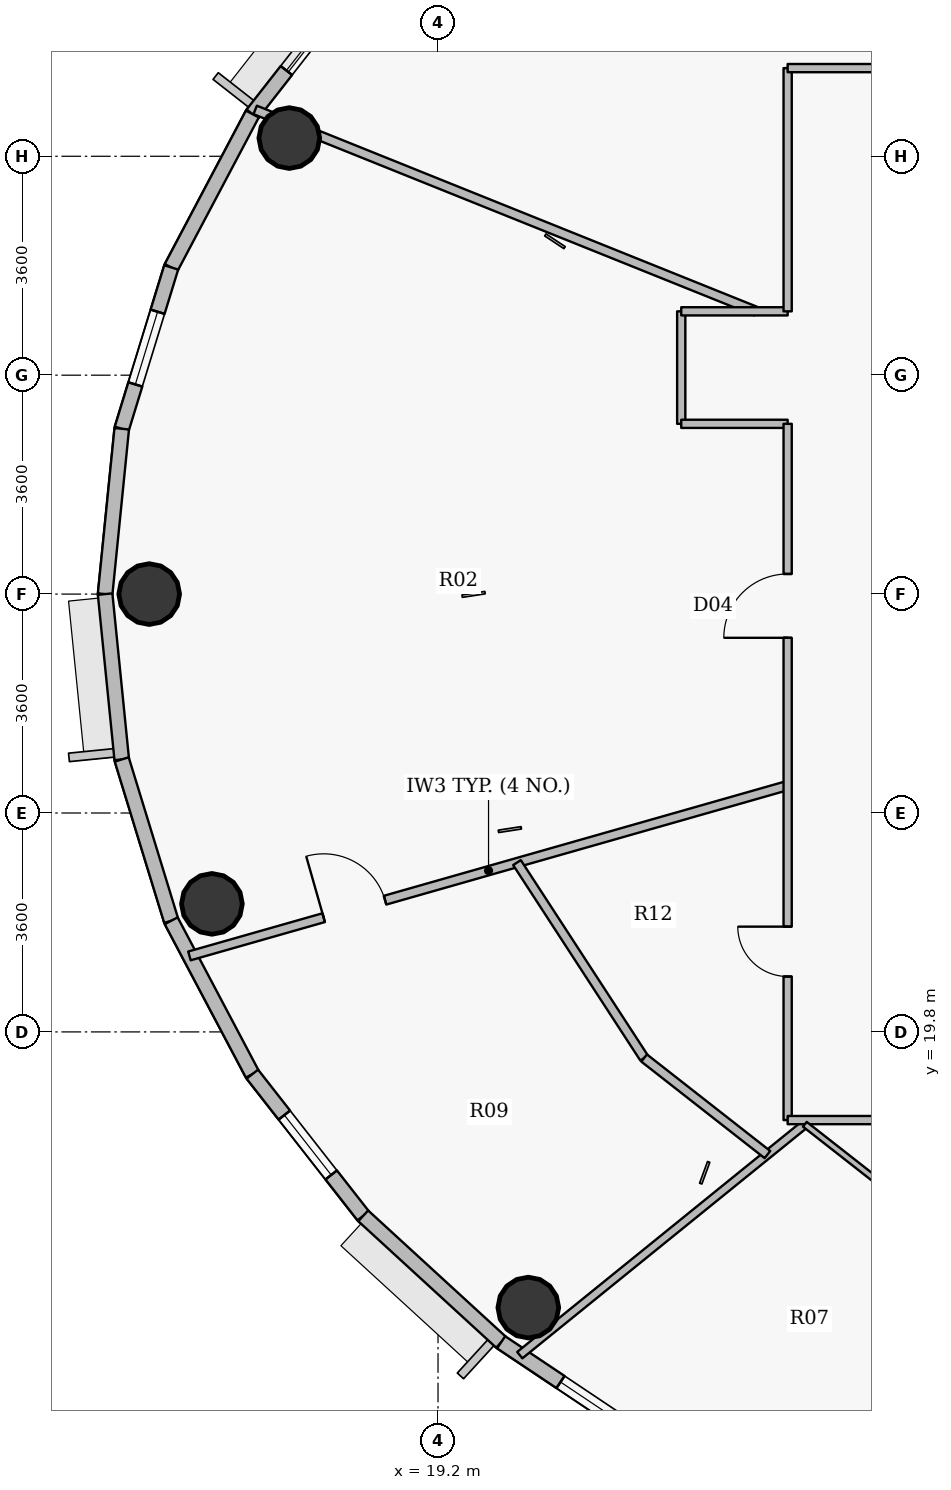
"""IFC4 building model, lengths in metres.
Left out: names, types, materials, properties, quantities, classifications, styles, units other than length and angle.
Written with IfcOpenShell. Run it as: python <this file> out.ifc"""

import sys

from ifc_helpers import new_model, si_unit, direction, frame, frame_2d, origin, origin_2d, place, context, subcontext, project, spatial, rectangle, hollow_circle, extrude, source, transform, mapped, element, fill, save


model = new_model("IFC4")
c1 = context("Model", 3, precision=1e-05, world=origin(), true_north=direction((0.0, 1.0)))
c2 = subcontext(c1, "Body", "Model", "MODEL_VIEW")
j1 = project(units=[si_unit("LENGTHUNIT", "METRE"), si_unit("PLANEANGLEUNIT", "RADIAN")], contexts=[c1])
p1 = place(None, origin())
s1 = spatial("IfcSite", under=j1, at=p1, CompositionType="ELEMENT")
p2 = place(p1, origin())
s2 = spatial("IfcBuilding", under=s1, at=p2, CompositionType="ELEMENT")
p3 = place(p2, frame((0.0, 0.0, 306.75)))
s3 = spatial("IfcBuildingStorey", under=s2, at=p3, CompositionType="ELEMENT", Elevation=306.75)
for number, where, z_axis, x_axis in (
    (1, (16.754, 34.5, 0.0), (0.0, 0.0, 1.0), (1.0, 0.0, 0.0)),
    (2, (14.45, 27.0, 0.0), (0.0, 0.0, 1.0), (1.0, 0.0, 0.0)),
    (3, (15.481, 21.906, 0.0), (0.0, 0.0, 1.0), (1.0, 0.0, 0.0)),
    (4, (20.685, 15.267, 0.0), (0.0, 0.0, 1.0), (1.0, 0.0, 0.0)),
):
    element("IfcColumn", number, at=place(p3, frame(where, z_axis=z_axis, x_axis=x_axis)), inside=s3, PredefinedType="COLUMN", context=c2, shape_type="SweptSolid", body=[
        extrude(hollow_circle(Radius=0.5, WallThickness=0.032, at=origin_2d()), origin(), (0.0, 0.0, 1.0), 3.75),
    ])
p4 = place(p3, frame((16.146, 34.895, 0.0), z_axis=(0.0, 0.0, 1.0), x_axis=(0.616337186556, 0.787482363275, 0.0)))
e5 = element("IfcWall", 5, at=p4, inside=s3, PredefinedType="SOLIDWALL", context=c2, shape_type="SweptSolid", body=[
    extrude(rectangle(XDim=2.958, YDim=0.24, at=frame_2d((1.479, 0.0))), origin(), (0.0, 0.0, 1.0), 3.5),
])
p5 = place(p4, frame((0.909, 0.0, 0.9)))
e6 = element("IfcOpeningElement", 6, at=p5, cuts=e5, PredefinedType="OPENING", context=c2, shape_type="SweptSolid", body=[
    extrude(rectangle(XDim=1.25, YDim=1.65, at=origin_2d()), frame((0.625, 0.13, 0.825), z_axis=(0.0, -1.0, 0.0), x_axis=(1.0, 0.0, 0.0)), (0.0, 0.0, 1.0), 0.26),
])
p6 = place(p3, frame((14.812, 32.372, 0.0), z_axis=(0.0, 0.0, 1.0), x_axis=(0.467628269026, 0.883925224218, 0.0)))
e7 = element("IfcWall", 7, at=p6, inside=s3, PredefinedType="SOLIDWALL", context=c2, shape_type="SweptSolid", body=[
    extrude(rectangle(XDim=2.854, YDim=0.24, at=frame_2d((1.427, 0.0))), origin(), (0.0, 0.0, 1.0), 3.5),
])
p7 = place(p3, frame((13.998, 29.719, 0.0), z_axis=(0.0, 0.0, 1.0), x_axis=(0.2931213403, 0.956075248012, 0.0)))
e8 = element("IfcWall", 8, at=p7, inside=s3, PredefinedType="SOLIDWALL", context=c2, shape_type="SweptSolid", body=[
    extrude(rectangle(XDim=2.775, YDim=0.24, at=frame_2d((1.388, 0.0))), origin(), (0.0, 0.0, 1.0), 3.5),
])
p8 = place(p7, frame((0.763, 0.0, 0.9)))
e9 = element("IfcOpeningElement", 9, at=p8, cuts=e8, PredefinedType="OPENING", context=c2, shape_type="SweptSolid", body=[
    extrude(rectangle(XDim=1.25, YDim=1.65, at=origin_2d()), frame((0.625, 0.13, 0.825), z_axis=(0.0, -1.0, 0.0), x_axis=(1.0, 0.0, 0.0)), (0.0, 0.0, 1.0), 0.26),
])
for number, where, z_axis, x_axis in (
    (10, (13.725, 27.0, 0.0), (0.0, 0.0, 1.0), (0.1, 0.995, 0.0)),
    (11, (13.998, 24.281, 0.0), (0.0, 0.0, 1.0), (-0.1, 0.995, 0.0)),
):
    element("IfcWall", number, at=place(p3, frame(where, z_axis=z_axis, x_axis=x_axis)), inside=s3, PredefinedType="SOLIDWALL", context=c2, shape_type="SweptSolid", body=[
        extrude(rectangle(XDim=2.733, YDim=0.24, at=frame_2d((1.366, 0.0))), origin(), (0.0, 0.0, 1.0), 3.5),
    ])
p9 = place(p3, frame((14.812, 21.628, 0.0), z_axis=(0.0, 0.0, 1.0), x_axis=(-0.2931213403, 0.956075248012, 0.0)))
e12 = element("IfcWall", 12, at=p9, inside=s3, PredefinedType="SOLIDWALL", context=c2, shape_type="SweptSolid", body=[
    extrude(rectangle(XDim=2.775, YDim=0.24, at=frame_2d((1.388, 0.0))), origin(), (0.0, 0.0, 1.0), 3.5),
])
p10 = place(p3, frame((16.146, 19.105, 0.0), z_axis=(0.0, 0.0, 1.0), x_axis=(-0.467628269026, 0.883925224218, 0.0)))
e13 = element("IfcWall", 13, at=p10, inside=s3, PredefinedType="SOLIDWALL", context=c2, shape_type="SweptSolid", body=[
    extrude(rectangle(XDim=2.854, YDim=0.24, at=frame_2d((1.427, 0.0))), origin(), (0.0, 0.0, 1.0), 3.5),
])
p11 = place(p3, frame((17.97, 16.775, 0.0), z_axis=(0.0, 0.0, 1.0), x_axis=(-0.616337186556, 0.787482363275, 0.0)))
e14 = element("IfcWall", 14, at=p11, inside=s3, PredefinedType="SOLIDWALL", context=c2, shape_type="SweptSolid", body=[
    extrude(rectangle(XDim=2.958, YDim=0.24, at=frame_2d((1.479, 0.0))), origin(), (0.0, 0.0, 1.0), 3.5),
])
p12 = place(p11, frame((0.854, 0.0, 0.9)))
e15 = element("IfcOpeningElement", 15, at=p12, cuts=e14, PredefinedType="OPENING", context=c2, shape_type="SweptSolid", body=[
    extrude(rectangle(XDim=1.25, YDim=1.65, at=origin_2d()), frame((0.625, 0.13, 0.825), z_axis=(0.0, -1.0, 0.0), x_axis=(1.0, 0.0, 0.0)), (0.0, 0.0, 1.0), 0.26),
])
p13 = place(p3, frame((20.238, 14.696, 0.0), z_axis=(0.0, 0.0, 1.0), x_axis=(-0.737068506972, 0.675818034703, 0.0)))
e16 = element("IfcWall", 16, at=p13, inside=s3, PredefinedType="SOLIDWALL", context=c2, shape_type="SweptSolid", body=[
    extrude(rectangle(XDim=3.077, YDim=0.24, at=frame_2d((1.539, 0.0))), origin(), (0.0, 0.0, 1.0), 3.5),
])
p14 = place(p3, frame((22.896, 12.918, 0.0), z_axis=(0.0, 0.0, 1.0), x_axis=(-0.831250592635, 0.55589787933, 0.0)))
e17 = element("IfcWall", 17, at=p14, inside=s3, PredefinedType="SOLIDWALL", context=c2, shape_type="SweptSolid", body=[
    extrude(rectangle(XDim=3.197, YDim=0.24, at=frame_2d((1.599, 0.0))), origin(), (0.0, 0.0, 1.0), 3.5),
])
p15 = place(p14, frame((0.772, 0.0, 0.9)))
e18 = element("IfcOpeningElement", 18, at=p15, cuts=e17, PredefinedType="OPENING", context=c2, shape_type="SweptSolid", body=[
    extrude(rectangle(XDim=1.25, YDim=1.65, at=origin_2d()), frame((0.625, 0.13, 0.825), z_axis=(0.0, -1.0, 0.0), x_axis=(1.0, 0.0, 0.0)), (0.0, 0.0, 1.0), 0.26),
])
p16 = place(p3, frame((15.112, 21.05, 0.0), z_axis=(0.0, 0.0, 1.0), x_axis=(0.961740695875, 0.273961373004, 0.0)))
e19 = element("IfcWall", 19, at=p16, inside=s3, PredefinedType="PARTITIONING", context=c2, shape_type="SweptSolid", body=[
    extrude(rectangle(XDim=10.229, YDim=0.15, at=frame_2d((5.115, 0.0))), origin(), (0.0, 0.0, 1.0), 2.985),
])
p17 = place(p16, frame((2.295, 0.0, 0.0)))
e20 = element("IfcOpeningElement", 20, at=p17, cuts=e19, PredefinedType="OPENING", context=c2, shape_type="SweptSolid", body=[
    extrude(rectangle(XDim=1.05, YDim=2.15, at=origin_2d()), frame((0.525, 0.085, 1.075), z_axis=(0.0, -1.0, 0.0), x_axis=(1.0, 0.0, 0.0)), (0.0, 0.0, 1.0), 0.17),
])
p18 = place(p3, frame((16.193, 34.962, 0.0), z_axis=(0.0, 0.0, 1.0), x_axis=(0.927839710722, -0.372979183343, 0.0)))
e21 = element("IfcWall", 21, at=p18, inside=s3, PredefinedType="PARTITIONING", context=c2, shape_type="SweptSolid", body=[
    extrude(rectangle(XDim=8.874, YDim=0.15, at=frame_2d((4.437, 0.0))), origin(), (0.0, 0.0, 1.0), 2.985),
])
p19 = place(p3, frame((20.499, 22.584, 0.0), z_axis=(0.0, 0.0, 1.0), x_axis=(0.545422512832, -0.838161250892, 0.0)))
e22 = element("IfcWall", 22, at=p19, inside=s3, PredefinedType="PARTITIONING", context=c2, shape_type="SweptSolid", body=[
    extrude(rectangle(XDim=3.834, YDim=0.15, at=frame_2d((1.917, 0.0))), origin(), (0.0, 0.0, 1.0), 3.5),
])
p20 = place(p3, frame((20.545, 14.485, 0.0), z_axis=(0.0, 0.0, 1.0), x_axis=(0.77715155867, 0.629313479004, 0.0)))
e23 = element("IfcWall", 23, at=p20, inside=s3, PredefinedType="PARTITIONING", context=c2, shape_type="SweptSolid", body=[
    extrude(rectangle(XDim=6.032, YDim=0.135, at=frame_2d((3.016, 0.0))), origin(), (0.0, 0.0, 1.0), 2.985),
])
p21 = place(p3, frame((22.59, 19.371, 0.0), z_axis=(0.0, 0.0, 1.0), x_axis=(0.78729093539, -0.616581692116, 0.0)))
e24 = element("IfcWall", 24, at=p21, inside=s3, PredefinedType="PARTITIONING", context=c2, shape_type="SweptSolid", body=[
    extrude(rectangle(XDim=2.576, YDim=0.15, at=frame_2d((1.288, 0.0))), origin(), (0.0, 0.0, 1.0), 3.035),
])
p22 = place(p3, frame((23.2, 29.8, 0.0), z_axis=(0.0, 0.0, 1.0), x_axis=(0.0, 1.0, 0.0)))
e25 = element("IfcWall", 25, at=p22, inside=s3, PredefinedType="PARTITIONING", context=c2, shape_type="SweptSolid", body=[
    extrude(rectangle(XDim=1.85, YDim=0.135, at=frame_2d((0.925, 0.0))), origin(), (0.0, 0.0, 1.0), 3.5),
])
p23 = place(p3, frame((23.2, 29.8, 0.0), z_axis=(0.0, 0.0, 1.0), x_axis=(1.0, 0.0, 0.0)))
e26 = element("IfcWall", 26, at=p23, inside=s3, PredefinedType="PARTITIONING", context=c2, shape_type="SweptSolid", body=[
    extrude(rectangle(XDim=1.75, YDim=0.135, at=frame_2d((0.875, 0.0))), origin(), (0.0, 0.0, 1.0), 3.5),
])
p24 = place(p3, frame((23.2, 31.65, 0.0), z_axis=(0.0, 0.0, 1.0), x_axis=(1.0, 0.0, 0.0)))
e27 = element("IfcWall", 27, at=p24, inside=s3, PredefinedType="PARTITIONING", context=c2, shape_type="SweptSolid", body=[
    extrude(rectangle(XDim=1.75, YDim=0.135, at=frame_2d((0.875, 0.0))), origin(), (0.0, 0.0, 1.0), 3.035),
])
p25 = place(p3, frame((24.95, 18.35, 0.0), z_axis=(0.0, 0.0, 1.0), x_axis=(0.0, 1.0, 0.0)))
e28 = element("IfcWall", 28, at=p25, inside=s3, PredefinedType="PARTITIONING", context=c2, shape_type="SweptSolid", body=[
    extrude(rectangle(XDim=11.45, YDim=0.135, at=frame_2d((5.725, 0.0))), origin(), (0.0, 0.0, 1.0), 3.035),
])
p26 = place(p25, frame((7.931, 0.0, 0.0)))
e29 = element("IfcOpeningElement", 29, at=p26, cuts=e28, PredefinedType="OPENING", context=c2, shape_type="SweptSolid", body=[
    extrude(rectangle(XDim=1.05, YDim=2.15, at=origin_2d()), frame((0.525, 0.078, 1.075), z_axis=(0.0, -1.0, 0.0), x_axis=(1.0, 0.0, 0.0)), (0.0, 0.0, 1.0), 0.155),
])
p27 = place(p25, frame((2.361, 0.0, 0.0)))
e30 = element("IfcOpeningElement", 30, at=p27, cuts=e28, PredefinedType="OPENING", context=c2, shape_type="SweptSolid", body=[
    extrude(rectangle(XDim=0.82, YDim=2.1, at=origin_2d()), frame((0.41, 0.078, 1.05), z_axis=(0.0, -1.0, 0.0), x_axis=(1.0, 0.0, 0.0)), (0.0, 0.0, 1.0), 0.155),
])
p28 = place(p3, frame((24.95, 18.35, 0.0), z_axis=(0.0, 0.0, 1.0), x_axis=(1.0, 0.0, 0.0)))
e31 = element("IfcWall", 31, at=p28, inside=s3, PredefinedType="PARTITIONING", context=c2, shape_type="SweptSolid", body=[
    extrude(rectangle(XDim=19.311, YDim=0.135, at=frame_2d((9.655, 0.0))), origin(), (0.0, 0.0, 1.0), 3.035),
])
p29 = place(p28, frame((9.319, 0.0, 0.0)))
e32 = element("IfcOpeningElement", 32, at=p29, cuts=e31, PredefinedType="OPENING", context=c2, shape_type="SweptSolid", body=[
    extrude(rectangle(XDim=1.0, YDim=2.15, at=origin_2d()), frame((0.5, 0.078, 1.075), z_axis=(0.0, -1.0, 0.0), x_axis=(1.0, 0.0, 0.0)), (0.0, 0.0, 1.0), 0.155),
])
p30 = place(p3, frame((24.95, 31.65, 0.0), z_axis=(0.0, 0.0, 1.0), x_axis=(0.0, 1.0, 0.0)))
e33 = element("IfcWall", 33, at=p30, inside=s3, PredefinedType="PARTITIONING", context=c2, shape_type="SweptSolid", body=[
    extrude(rectangle(XDim=4.0, YDim=0.135, at=frame_2d((2.0, 0.0))), origin(), (0.0, 0.0, 1.0), 3.035),
])
p31 = place(p3, frame((24.95, 35.65, 0.0), z_axis=(0.0, 0.0, 1.0), x_axis=(1.0, 0.0, 0.0)))
e34 = element("IfcWall", 34, at=p31, inside=s3, PredefinedType="PARTITIONING", context=c2, shape_type="SweptSolid", body=[
    extrude(rectangle(XDim=10.1, YDim=0.135, at=frame_2d((5.05, 0.0))), origin(), (0.0, 0.0, 1.0), 3.035),
])
p32 = place(p31, frame((3.094, 0.0, 0.0)))
e35 = element("IfcOpeningElement", 35, at=p32, cuts=e34, PredefinedType="OPENING", context=c2, shape_type="SweptSolid", body=[
    extrude(rectangle(XDim=1.05, YDim=2.15, at=origin_2d()), frame((0.525, 0.078, 1.075), z_axis=(0.0, -1.0, 0.0), x_axis=(1.0, 0.0, 0.0)), (0.0, 0.0, 1.0), 0.155),
])
p33 = place(p3, frame((25.233, 18.281, 0.0), z_axis=(0.0, 0.0, 1.0), x_axis=(0.787345395334, -0.61651214785, 0.0)))
e36 = element("IfcWall", 36, at=p33, inside=s3, PredefinedType="PARTITIONING", context=c2, shape_type="SweptSolid", body=[
    extrude(rectangle(XDim=1.969, YDim=0.1, at=frame_2d((0.985, 0.0))), origin(), (0.0, 0.0, 1.0), 3.5),
])
m1 = source(origin(), c2, "Body", "SweptSolid", [
    extrude(rectangle(XDim=1.25, YDim=1.65, at=origin_2d()), frame((0.625, 0.03, 0.825), z_axis=(0.0, -1.0, 0.0), x_axis=(1.0, 0.0, 0.0)), (0.0, 0.0, 1.0), 0.06),
])
p34 = place(p5, origin())
e37 = element("IfcWindow", 37, at=p34, inside=s3, PartitioningType="SINGLE_PANEL", PredefinedType="WINDOW", context=c2, shape_type="MappedRepresentation", body=[
    mapped(m1, transform((0.0, 0.0, 0.0), x_axis=(1.0, 0.0, 0.0), y_axis=(0.0, 1.0, 0.0), z_axis=(0.0, 0.0, 1.0), scale=1.0)),
])
fill(e6, e37)
p35 = place(p8, origin())
e38 = element("IfcWindow", 38, at=p35, inside=s3, PartitioningType="SINGLE_PANEL", PredefinedType="WINDOW", context=c2, shape_type="MappedRepresentation", body=[
    mapped(m1, transform((0.0, 0.0, 0.0), x_axis=(1.0, 0.0, 0.0), y_axis=(0.0, 1.0, 0.0), z_axis=(0.0, 0.0, 1.0), scale=1.0)),
])
fill(e9, e38)
p36 = place(p12, origin())
e39 = element("IfcWindow", 39, at=p36, inside=s3, PartitioningType="SINGLE_PANEL", PredefinedType="WINDOW", context=c2, shape_type="MappedRepresentation", body=[
    mapped(m1, transform((0.0, 0.0, 0.0), x_axis=(1.0, 0.0, 0.0), y_axis=(0.0, 1.0, 0.0), z_axis=(0.0, 0.0, 1.0), scale=1.0)),
])
fill(e15, e39)
p37 = place(p15, origin())
e40 = element("IfcWindow", 40, at=p37, inside=s3, PartitioningType="SINGLE_PANEL", PredefinedType="WINDOW", context=c2, shape_type="MappedRepresentation", body=[
    mapped(m1, transform((0.0, 0.0, 0.0), x_axis=(1.0, 0.0, 0.0), y_axis=(0.0, 1.0, 0.0), z_axis=(0.0, 0.0, 1.0), scale=1.0)),
])
fill(e18, e40)
m2 = source(origin(), c2, "Body", "SweptSolid", [
    extrude(rectangle(XDim=1.05, YDim=2.15, at=origin_2d()), frame((0.525, 0.025, 1.075), z_axis=(0.0, -1.0, 0.0), x_axis=(1.0, 0.0, 0.0)), (0.0, 0.0, 1.0), 0.05),
])
p38 = place(p26, origin())
e41 = element("IfcDoor", 41, at=p38, inside=s3, OperationType="SINGLE_SWING_LEFT", PredefinedType="DOOR", context=c2, shape_type="MappedRepresentation", body=[
    mapped(m2, transform((0.0, 0.0, 0.0), x_axis=(1.0, 0.0, 0.0), y_axis=(0.0, 1.0, 0.0), z_axis=(0.0, 0.0, 1.0), scale=1.0)),
])
fill(e29, e41)
m3 = source(origin(), c2, "Body", "SweptSolid", [
    extrude(rectangle(XDim=0.82, YDim=2.1, at=origin_2d()), frame((0.41, 0.025, 1.05), z_axis=(0.0, -1.0, 0.0), x_axis=(1.0, 0.0, 0.0)), (0.0, 0.0, 1.0), 0.05),
])
p39 = place(p27, origin())
e42 = element("IfcDoor", 42, at=p39, inside=s3, OperationType="SINGLE_SWING_RIGHT", PredefinedType="DOOR", context=c2, shape_type="MappedRepresentation", body=[
    mapped(m3, transform((0.0, 0.0, 0.0), x_axis=(1.0, 0.0, 0.0), y_axis=(0.0, 1.0, 0.0), z_axis=(0.0, 0.0, 1.0), scale=1.0)),
])
fill(e30, e42)
p40 = place(p17, origin())
e43 = element("IfcDoor", 43, at=p40, inside=s3, OperationType="SINGLE_SWING_LEFT", PredefinedType="DOOR", context=c2, shape_type="MappedRepresentation", body=[
    mapped(m2, transform((0.0, 0.0, 0.0), x_axis=(1.0, 0.0, 0.0), y_axis=(0.0, 1.0, 0.0), z_axis=(0.0, 0.0, 1.0), scale=1.0)),
])
fill(e20, e43)
save(model, sys.argv[1])
